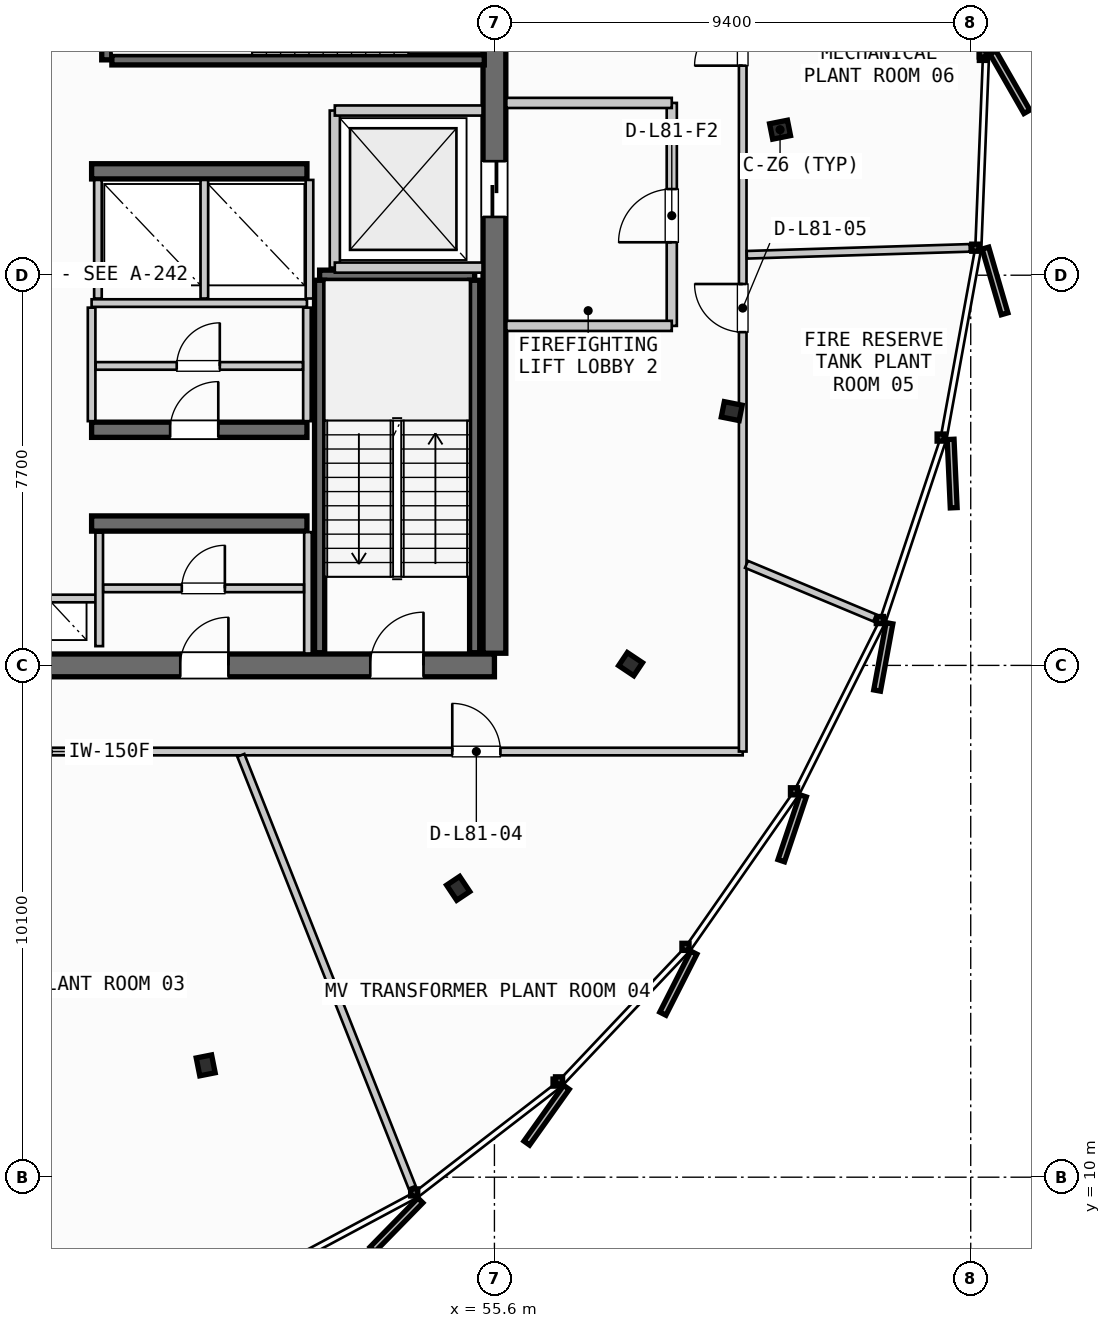
"""IFC4 building model, lengths in metres.
Left out: names, types, materials, properties, quantities, classifications, styles, units other than length and angle.
Written with IfcOpenShell. Run it as: python <this file> out.ifc"""

import sys

from ifc_helpers import new_model, si_unit, direction, frame, frame_2d, origin, origin_2d, place, context, subcontext, project, spatial, rectangle, i_section, extrude, source, transform, mapped, element, fill, save


model = new_model("IFC4")
c1 = context("Model", 3, precision=1e-05, world=origin(), true_north=direction((0.0, 1.0)))
c2 = subcontext(c1, "Body", "Model", "MODEL_VIEW")
j1 = project(units=[si_unit("LENGTHUNIT", "METRE"), si_unit("PLANEANGLEUNIT", "RADIAN")], contexts=[c1])
p1 = place(None, origin())
s1 = spatial("IfcSite", under=j1, at=p1, CompositionType="ELEMENT")
p2 = place(p1, origin())
s2 = spatial("IfcBuilding", under=s1, at=p2, CompositionType="ELEMENT")
p3 = place(p2, frame((0.0, 0.0, 304.3)))
s3 = spatial("IfcBuildingStorey", under=s2, at=p3, CompositionType="ELEMENT", Elevation=304.3)
p4 = place(p3, frame((38.0, 20.1, 0.0), z_axis=(0.0, 0.0, 1.0), x_axis=(1.0, 0.0, 0.0)))
e1 = element("IfcWall", 1, at=p4, inside=s3, PredefinedType="SHEAR", context=c2, shape_type="SweptSolid", body=[
    extrude(rectangle(XDim=17.6, YDim=0.45, at=frame_2d((8.8, 0.0))), origin(), (0.0, 0.0, 1.0), 3.735),
])
p5 = place(p4, frame((1.4, 0.0, 0.0)))
e2 = element("IfcOpeningElement", 2, at=p5, cuts=e1, PredefinedType="OPENING", context=c2, shape_type="SweptSolid", body=[
    extrude(rectangle(XDim=1.05, YDim=2.15, at=frame_2d((0.525, 1.075))), frame((0.0, 0.235, 0.0), z_axis=(0.0, -1.0, 0.0), x_axis=(1.0, 0.0, 0.0)), (0.0, 0.0, 1.0), 0.47),
])
p6 = place(p4, frame((15.15, 0.0, 0.0)))
e3 = element("IfcOpeningElement", 3, at=p6, cuts=e1, PredefinedType="OPENING", context=c2, shape_type="SweptSolid", body=[
    extrude(rectangle(XDim=1.05, YDim=2.15, at=frame_2d((0.525, 1.075))), frame((0.0, 0.235, 0.0), z_axis=(0.0, -1.0, 0.0), x_axis=(1.0, 0.0, 0.0)), (0.0, 0.0, 1.0), 0.47),
])
p7 = place(p4, frame((5.25, 0.0, 0.0)))
e4 = element("IfcOpeningElement", 4, at=p7, cuts=e1, PredefinedType="OPENING", context=c2, shape_type="SweptSolid", body=[
    extrude(rectangle(XDim=0.9, YDim=2.15, at=frame_2d((0.45, 1.075))), frame((0.0, 0.235, 0.0), z_axis=(0.0, -1.0, 0.0), x_axis=(1.0, 0.0, 0.0)), (0.0, 0.0, 1.0), 0.47),
])
p8 = place(p4, frame((11.4, 0.0, 0.0)))
e5 = element("IfcOpeningElement", 5, at=p8, cuts=e1, PredefinedType="OPENING", context=c2, shape_type="SweptSolid", body=[
    extrude(rectangle(XDim=0.95, YDim=2.15, at=frame_2d((0.475, 1.075))), frame((0.0, 0.235, 0.0), z_axis=(0.0, -1.0, 0.0), x_axis=(1.0, 0.0, 0.0)), (0.0, 0.0, 1.0), 0.47),
])
p9 = place(p3, frame((55.6, 20.34, 0.0), z_axis=(0.0, 0.0, 1.0), x_axis=(0.0, 1.0, 0.0)))
e6 = element("IfcWall", 6, at=p9, inside=s3, PredefinedType="SHEAR", context=c2, shape_type="SweptSolid", body=[
    extrude(rectangle(XDim=14.92, YDim=0.45, at=frame_2d((7.46, 0.0))), origin(), (0.0, 0.0, 1.0), 3.735),
])
p10 = place(p9, frame((12.71, 0.0, 0.0)))
e7 = element("IfcOpeningElement", 7, at=p10, cuts=e6, PredefinedType="OPENING", context=c2, shape_type="SweptSolid", body=[
    extrude(rectangle(XDim=1.05, YDim=2.15, at=frame_2d((0.525, 1.075))), frame((0.0, 0.235, 0.0), z_axis=(0.0, -1.0, 0.0), x_axis=(1.0, 0.0, 0.0)), (0.0, 0.0, 1.0), 0.47),
])
p11 = place(p9, frame((8.61, 0.0, 0.0)))
e8 = element("IfcOpeningElement", 8, at=p11, cuts=e6, PredefinedType="OPENING", context=c2, shape_type="SweptSolid", body=[
    extrude(rectangle(XDim=1.1, YDim=2.2, at=frame_2d((0.55, 1.1))), frame((0.0, 0.235, 0.0), z_axis=(0.0, -1.0, 0.0), x_axis=(1.0, 0.0, 0.0)), (0.0, 0.0, 1.0), 0.47),
])
p12 = place(p3, frame((47.65, 22.9, 0.0), z_axis=(0.0, 0.0, 1.0), x_axis=(1.0, 0.0, 0.0)))
e9 = element("IfcWall", 9, at=p12, inside=s3, PredefinedType="SHEAR", context=c2, shape_type="SweptSolid", body=[
    extrude(rectangle(XDim=4.25, YDim=0.3, at=frame_2d((2.125, 0.0))), origin(), (0.0, 0.0, 1.0), 3.735),
])
p13 = place(p3, frame((47.65, 24.75, 0.0), z_axis=(0.0, 0.0, 1.0), x_axis=(1.0, 0.0, 0.0)))
e10 = element("IfcWall", 10, at=p13, inside=s3, PredefinedType="SHEAR", context=c2, shape_type="SweptSolid", body=[
    extrude(rectangle(XDim=4.25, YDim=0.3, at=frame_2d((2.125, 0.0))), origin(), (0.0, 0.0, 1.0), 3.735),
])
p14 = place(p13, frame((1.55, 0.0, 0.0)))
e11 = element("IfcOpeningElement", 11, at=p14, cuts=e10, PredefinedType="OPENING", context=c2, shape_type="SweptSolid", body=[
    extrude(rectangle(XDim=0.95, YDim=2.15, at=frame_2d((0.475, 1.075))), frame((0.0, 0.16, 0.0), z_axis=(0.0, -1.0, 0.0), x_axis=(1.0, 0.0, 0.0)), (0.0, 0.0, 1.0), 0.32),
])
p15 = place(p3, frame((47.65, 29.85, 0.0), z_axis=(0.0, 0.0, 1.0), x_axis=(1.0, 0.0, 0.0)))
e12 = element("IfcWall", 12, at=p15, inside=s3, PredefinedType="SHEAR", context=c2, shape_type="SweptSolid", body=[
    extrude(rectangle(XDim=4.25, YDim=0.3, at=frame_2d((2.125, 0.0))), origin(), (0.0, 0.0, 1.0), 3.735),
])
m1 = source(origin(), c2, "Body", "SweptSolid", [
    extrude(i_section(OverallWidth=0.309, OverallDepth=0.359, WebThickness=0.016, FlangeThickness=0.026, FilletRadius=0.027, at=origin_2d()), origin(), (0.0, 0.0, 1.0), 3.735),
])
for number, where, z_axis, x_axis in (
    (13, (61.237, 30.672, 0.0), (0.0, 0.0, 1.0), (0.981, 0.195, 0.0)),
    (14, (49.902, 12.207, 0.0), (0.0, 0.0, 1.0), (0.195, -0.981, 0.0)),
    (15, (54.885, 15.7, 0.0), (0.0, 0.0, 1.0), (0.556, -0.831, 0.0)),
    (16, (58.287, 20.125, 0.0), (0.0, 0.0, 1.0), (0.831, -0.556, 0.0)),
    (17, (60.284, 25.118, 0.0), (0.0, 0.0, 1.0), (0.981, -0.195, 0.0)),
):
    element("IfcColumn", number, at=place(p3, frame(where, z_axis=z_axis, x_axis=x_axis)), inside=s3, PredefinedType="COLUMN", context=c2, shape_type="MappedRepresentation", body=[
        mapped(m1, transform((0.0, 0.0, 0.0), scale=1.0)),
    ])
p16 = place(p3, frame((52.15, 27.8, 0.0), z_axis=(0.0, 0.0, 1.0), x_axis=(1.0, 0.0, 0.0)))
e18 = element("IfcWall", 18, at=p16, inside=s3, PredefinedType="SHEAR", context=c2, shape_type="SweptSolid", body=[
    extrude(rectangle(XDim=3.06, YDim=0.2, at=frame_2d((1.53, 0.0))), origin(), (0.0, 0.0, 1.0), 3.735),
])
for number, where, z_axis, x_axis in (
    (19, (55.21, 27.7, 0.0), (0.0, 0.0, 1.0), (0.0, -1.0, 0.0)),
    (20, (52.15, 20.35, 0.0), (0.0, 0.0, 1.0), (0.0, 1.0, 0.0)),
):
    element("IfcWall", number, at=place(p3, frame(where, z_axis=z_axis, x_axis=x_axis)), inside=s3, PredefinedType="SHEAR", context=c2, shape_type="SweptSolid", body=[
        extrude(rectangle(XDim=7.35, YDim=0.2, at=frame_2d((3.675, 0.0))), origin(), (0.0, 0.0, 1.0), 3.735),
    ])
p17 = place(p3, frame((47.95, 32.05, 0.0), z_axis=(0.0, 0.0, 1.0), x_axis=(0.0, 1.0, 0.0)))
e21 = element("IfcWall", 21, at=p17, inside=s3, PredefinedType="SHEAR", context=c2, shape_type="SweptSolid", body=[
    extrude(rectangle(XDim=3.06, YDim=0.2, at=frame_2d((1.53, 0.0))), origin(), (0.0, 0.0, 1.0), 3.735),
])
p18 = place(p3, frame((55.4, 32.05, 0.0), z_axis=(0.0, 0.0, 1.0), x_axis=(-1.0, 0.0, 0.0)))
e22 = element("IfcWall", 22, at=p18, inside=s3, PredefinedType="SHEAR", context=c2, shape_type="SweptSolid", body=[
    extrude(rectangle(XDim=7.35, YDim=0.2, at=frame_2d((3.675, 0.0))), origin(), (0.0, 0.0, 1.0), 3.735),
])
p19 = place(p3, frame((45.8, 21.42, 0.0), z_axis=(0.0, 0.0, 1.0), x_axis=(1.0, 0.0, 0.0)))
e23 = element("IfcWall", 23, at=p19, inside=s3, PredefinedType="PARTITIONING", context=c2, shape_type="SweptSolid", body=[
    extrude(rectangle(XDim=2.0, YDim=0.15, at=frame_2d((1.0, 0.0))), origin(), (0.0, 0.0, 1.0), 3.26),
])
p20 = place(p3, frame((47.8, 20.48, 0.0), z_axis=(0.0, 0.0, 1.0), x_axis=(0.0, 1.0, 0.0)))
e24 = element("IfcWall", 24, at=p20, inside=s3, PredefinedType="PARTITIONING", context=c2, shape_type="SweptSolid", body=[
    extrude(rectangle(XDim=2.24, YDim=0.15, at=frame_2d((1.12, 0.0))), origin(), (0.0, 0.0, 1.0), 3.26),
])
p21 = place(p3, frame((52.45, 27.95, 0.0), z_axis=(0.0, 0.0, 1.0), x_axis=(0.0, 1.0, 0.0)))
e25 = element("IfcWall", 25, at=p21, inside=s3, PredefinedType="PARTITIONING", context=c2, shape_type="SweptSolid", body=[
    extrude(rectangle(XDim=3.1, YDim=0.2, at=frame_2d((1.55, 0.0))), origin(), (0.0, 0.0, 1.0), 3.26),
])
for number, where, z_axis, x_axis in (
    (26, (52.45, 27.95, 0.0), (0.0, 0.0, 1.0), (1.0, 0.0, 0.0)),
    (27, (52.45, 31.05, 0.0), (0.0, 0.0, 1.0), (1.0, 0.0, 0.0)),
):
    element("IfcWall", number, at=place(p3, frame(where, z_axis=z_axis, x_axis=x_axis)), inside=s3, PredefinedType="PARTITIONING", context=c2, shape_type="SweptSolid", body=[
        extrude(rectangle(XDim=2.915, YDim=0.2, at=frame_2d((1.458, 0.0))), origin(), (0.0, 0.0, 1.0), 3.26),
    ])
p22 = place(p3, frame((59.1, 26.8, 0.0), z_axis=(0.0, 0.0, 1.0), x_axis=(0.0, 1.0, 0.0)))
e28 = element("IfcWall", 28, at=p22, inside=s3, PredefinedType="PARTITIONING", context=c2, shape_type="SweptSolid", body=[
    extrude(rectangle(XDim=4.4, YDim=0.2, at=frame_2d((2.2, 0.0))), origin(), (0.0, 0.0, 1.0), 3.26),
])
p23 = place(p22, frame((1.65, 0.0, 0.0)))
e29 = element("IfcOpeningElement", 29, at=p23, cuts=e28, PredefinedType="OPENING", context=c2, shape_type="SweptSolid", body=[
    extrude(rectangle(XDim=1.05, YDim=2.15, at=frame_2d((0.525, 1.075))), frame((0.0, 0.11, 0.0), z_axis=(0.0, -1.0, 0.0), x_axis=(1.0, 0.0, 0.0)), (0.0, 0.0, 1.0), 0.22),
])
for number, where, z_axis, x_axis in (
    (30, (55.835, 26.8, 0.0), (0.0, 0.0, 1.0), (1.0, 0.0, 0.0)),
    (31, (55.835, 31.2, 0.0), (0.0, 0.0, 1.0), (1.0, 0.0, 0.0)),
):
    element("IfcWall", number, at=place(p3, frame(where, z_axis=z_axis, x_axis=x_axis)), inside=s3, PredefinedType="PARTITIONING", context=c2, shape_type="SweptSolid", body=[
        extrude(rectangle(XDim=3.265, YDim=0.2, at=frame_2d((1.633, 0.0))), origin(), (0.0, 0.0, 1.0), 3.26),
    ])
p24 = place(p3, frame((51.92, 20.335, 0.0), z_axis=(0.0, 0.0, 1.0), x_axis=(0.0, 1.0, 0.0)))
e32 = element("IfcWall", 32, at=p24, inside=s3, PredefinedType="PARTITIONING", context=c2, shape_type="SweptSolid", body=[
    extrude(rectangle(XDim=2.395, YDim=0.15, at=frame_2d((1.198, 0.0))), origin(), (0.0, 0.0, 1.0), 3.26),
])
p25 = place(p3, frame((47.88, 21.62, 0.0), z_axis=(0.0, 0.0, 1.0), x_axis=(1.0, 0.0, 0.0)))
e33 = element("IfcWall", 33, at=p25, inside=s3, PredefinedType="PARTITIONING", context=c2, shape_type="SweptSolid", body=[
    extrude(rectangle(XDim=3.96, YDim=0.15, at=frame_2d((1.98, 0.0))), origin(), (0.0, 0.0, 1.0), 3.26),
])
p26 = place(p25, frame((1.55, 0.0, 0.0)))
e34 = element("IfcOpeningElement", 34, at=p26, cuts=e33, PredefinedType="OPENING", context=c2, shape_type="SweptSolid", body=[
    extrude(rectangle(XDim=0.85, YDim=2.15, at=frame_2d((0.425, 1.075))), frame((0.0, 0.085, 0.0), z_axis=(0.0, -1.0, 0.0), x_axis=(1.0, 0.0, 0.0)), (0.0, 0.0, 1.0), 0.17),
])
p27 = place(p3, frame((47.65, 27.25, 0.0), z_axis=(0.0, 0.0, 1.0), x_axis=(1.0, 0.0, 0.0)))
e35 = element("IfcWall", 35, at=p27, inside=s3, PredefinedType="PARTITIONING", context=c2, shape_type="SweptSolid", body=[
    extrude(rectangle(XDim=4.25, YDim=0.15, at=frame_2d((2.125, 0.0))), origin(), (0.0, 0.0, 1.0), 3.26),
])
for number, where, z_axis, x_axis in (
    (36, (47.65, 24.92, 0.0), (0.0, 0.0, 1.0), (0.0, 1.0, 0.0)),
    (37, (51.9, 24.92, 0.0), (0.0, 0.0, 1.0), (0.0, 1.0, 0.0)),
):
    element("IfcWall", number, at=place(p3, frame(where, z_axis=z_axis, x_axis=x_axis)), inside=s3, PredefinedType="PARTITIONING", context=c2, shape_type="SweptSolid", body=[
        extrude(rectangle(XDim=2.24, YDim=0.15, at=frame_2d((1.12, 0.0))), origin(), (0.0, 0.0, 1.0), 3.26),
    ])
p28 = place(p3, frame((47.73, 26.01, 0.0), z_axis=(0.0, 0.0, 1.0), x_axis=(1.0, 0.0, 0.0)))
e38 = element("IfcWall", 38, at=p28, inside=s3, PredefinedType="PARTITIONING", context=c2, shape_type="SweptSolid", body=[
    extrude(rectangle(XDim=4.09, YDim=0.15, at=frame_2d((2.045, 0.0))), origin(), (0.0, 0.0, 1.0), 3.26),
])
p29 = place(p28, frame((1.6, 0.0, 0.0)))
e39 = element("IfcOpeningElement", 39, at=p29, cuts=e38, PredefinedType="OPENING", context=c2, shape_type="SweptSolid", body=[
    extrude(rectangle(XDim=0.85, YDim=2.15, at=frame_2d((0.425, 1.075))), frame((0.0, 0.085, 0.0), z_axis=(0.0, -1.0, 0.0), x_axis=(1.0, 0.0, 0.0)), (0.0, 0.0, 1.0), 0.17),
])
for number, where, z_axis, x_axis in (
    (40, (47.775, 27.34, 0.0), (0.0, 0.0, 1.0), (0.0, 1.0, 0.0)),
    (41, (49.875, 27.34, 0.0), (0.0, 0.0, 1.0), (0.0, 1.0, 0.0)),
    (42, (51.95, 27.34, 0.0), (0.0, 0.0, 1.0), (0.0, 1.0, 0.0)),
):
    element("IfcWall", number, at=place(p3, frame(where, z_axis=z_axis, x_axis=x_axis)), inside=s3, PredefinedType="PARTITIONING", context=c2, shape_type="SweptSolid", body=[
        extrude(rectangle(XDim=2.34, YDim=0.15, at=frame_2d((1.17, 0.0))), origin(), (0.0, 0.0, 1.0), 3.26),
    ])
p30 = place(p3, frame((33.1, 18.4, 0.0), z_axis=(0.0, 0.0, 1.0), x_axis=(1.0, 0.0, 0.0)))
e43 = element("IfcWall", 43, at=p30, inside=s3, PredefinedType="PARTITIONING", context=c2, shape_type="SweptSolid", body=[
    extrude(rectangle(XDim=27.4, YDim=0.15, at=frame_2d((13.7, 0.0))), origin(), (0.0, 0.0, 1.0), 3.26),
])
p31 = place(p30, frame((5.174, 0.0, 0.0)))
e44 = element("IfcOpeningElement", 44, at=p31, cuts=e43, PredefinedType="OPENING", context=c2, shape_type="SweptSolid", body=[
    extrude(rectangle(XDim=0.95, YDim=2.15, at=frame_2d((0.475, 1.075))), frame((0.0, 0.085, 0.0), z_axis=(0.0, -1.0, 0.0), x_axis=(1.0, 0.0, 0.0)), (0.0, 0.0, 1.0), 0.17),
])
p32 = place(p30, frame((12.302, 0.0, 0.0)))
e45 = element("IfcOpeningElement", 45, at=p32, cuts=e43, PredefinedType="OPENING", context=c2, shape_type="SweptSolid", body=[
    extrude(rectangle(XDim=0.95, YDim=2.15, at=frame_2d((0.475, 1.075))), frame((0.0, 0.085, 0.0), z_axis=(0.0, -1.0, 0.0), x_axis=(1.0, 0.0, 0.0)), (0.0, 0.0, 1.0), 0.17),
])
p33 = place(p30, frame((21.668, 0.0, 0.0)))
e46 = element("IfcOpeningElement", 46, at=p33, cuts=e43, PredefinedType="OPENING", context=c2, shape_type="SweptSolid", body=[
    extrude(rectangle(XDim=0.95, YDim=2.15, at=frame_2d((0.475, 1.075))), frame((0.0, 0.085, 0.0), z_axis=(0.0, -1.0, 0.0), x_axis=(1.0, 0.0, 0.0)), (0.0, 0.0, 1.0), 0.17),
])
p34 = place(p3, frame((60.5, 18.4, 0.0), z_axis=(0.0, 0.0, 1.0), x_axis=(0.0, 1.0, 0.0)))
e47 = element("IfcWall", 47, at=p34, inside=s3, PredefinedType="PARTITIONING", context=c2, shape_type="SweptSolid", body=[
    extrude(rectangle(XDim=18.8, YDim=0.15, at=frame_2d((9.4, 0.0))), origin(), (0.0, 0.0, 1.0), 3.26),
])
p35 = place(p34, frame((8.276, 0.0, 0.0)))
e48 = element("IfcOpeningElement", 48, at=p35, cuts=e47, PredefinedType="OPENING", context=c2, shape_type="SweptSolid", body=[
    extrude(rectangle(XDim=0.95, YDim=2.15, at=frame_2d((0.475, 1.075))), frame((0.0, 0.085, 0.0), z_axis=(0.0, -1.0, 0.0), x_axis=(1.0, 0.0, 0.0)), (0.0, 0.0, 1.0), 0.17),
])
p36 = place(p34, frame((13.535, 0.0, 0.0)))
e49 = element("IfcOpeningElement", 49, at=p36, cuts=e47, PredefinedType="OPENING", context=c2, shape_type="SweptSolid", body=[
    extrude(rectangle(XDim=0.95, YDim=2.15, at=frame_2d((0.475, 1.075))), frame((0.0, 0.085, 0.0), z_axis=(0.0, -1.0, 0.0), x_axis=(1.0, 0.0, 0.0)), (0.0, 0.0, 1.0), 0.17),
])
p37 = place(p3, frame((50.595, 18.326, 0.0), z_axis=(0.0, 0.0, 1.0), x_axis=(0.368634843387, -0.929574285488, 0.0)))
e50 = element("IfcWall", 50, at=p37, inside=s3, PredefinedType="PARTITIONING", context=c2, shape_type="SweptSolid", body=[
    extrude(rectangle(XDim=9.17, YDim=0.15, at=frame_2d((4.585, 0.0))), origin(), (0.0, 0.0, 1.0), 3.26),
])
p38 = place(p3, frame((60.574, 22.094, 0.0), z_axis=(0.0, 0.0, 1.0), x_axis=(0.92276063228, -0.385373605109, 0.0)))
e51 = element("IfcWall", 51, at=p38, inside=s3, PredefinedType="PARTITIONING", context=c2, shape_type="SweptSolid", body=[
    extrude(rectangle(XDim=2.743, YDim=0.15, at=frame_2d((1.372, 0.0))), origin(), (0.0, 0.0, 1.0), 3.26),
])
p39 = place(p3, frame((60.58, 28.203, 0.0), z_axis=(0.0, 0.0, 1.0), x_axis=(0.999517686505, 0.031054699536, 0.0)))
e52 = element("IfcWall", 52, at=p39, inside=s3, PredefinedType="PARTITIONING", context=c2, shape_type="SweptSolid", body=[
    extrude(rectangle(XDim=4.403, YDim=0.15, at=frame_2d((2.201, 0.0))), origin(), (0.0, 0.0, 1.0), 3.26),
])
m2 = source(origin(), c2, "Body", "SweptSolid", [
    extrude(rectangle(XDim=1.05, YDim=2.15, at=frame_2d((0.525, 1.075))), frame((0.0, 0.025, 0.0), z_axis=(0.0, -1.0, 0.0), x_axis=(1.0, 0.0, 0.0)), (0.0, 0.0, 1.0), 0.05),
])
p40 = place(p6, origin())
e53 = element("IfcDoor", 53, at=p40, inside=s3, OperationType="SINGLE_SWING_RIGHT", PredefinedType="DOOR", context=c2, shape_type="MappedRepresentation", body=[
    mapped(m2, transform((0.0, 0.0, 0.0), scale=1.0)),
])
fill(e3, e53)
m3 = source(origin(), c2, "Body", "SweptSolid", [
    extrude(rectangle(XDim=1.1, YDim=2.2, at=frame_2d((0.55, 1.1))), frame((0.0, 0.025, 0.0), z_axis=(0.0, -1.0, 0.0), x_axis=(1.0, 0.0, 0.0)), (0.0, 0.0, 1.0), 0.05),
])
p41 = place(p11, origin())
e54 = element("IfcDoor", 54, at=p41, inside=s3, OperationType="SLIDING_TO_RIGHT", PredefinedType="DOOR", context=c2, shape_type="MappedRepresentation", body=[
    mapped(m3, transform((0.0, 0.0, 0.0), scale=1.0)),
])
fill(e8, e54)
m4 = source(origin(), c2, "Body", "SweptSolid", [
    extrude(rectangle(XDim=0.95, YDim=2.15, at=frame_2d((0.475, 1.075))), frame((0.0, 0.025, 0.0), z_axis=(0.0, -1.0, 0.0), x_axis=(1.0, 0.0, 0.0)), (0.0, 0.0, 1.0), 0.05),
])
p42 = place(p8, origin())
e55 = element("IfcDoor", 55, at=p42, inside=s3, OperationType="SINGLE_SWING_RIGHT", PredefinedType="DOOR", context=c2, shape_type="MappedRepresentation", body=[
    mapped(m4, transform((0.0, 0.0, 0.0), scale=1.0)),
])
fill(e5, e55)
p43 = place(p14, origin())
e56 = element("IfcDoor", 56, at=p43, inside=s3, OperationType="SINGLE_SWING_RIGHT", PredefinedType="DOOR", context=c2, shape_type="MappedRepresentation", body=[
    mapped(m4, transform((0.0, 0.0, 0.0), scale=1.0)),
])
fill(e11, e56)
p44 = place(p23, origin())
e57 = element("IfcDoor", 57, at=p44, inside=s3, OperationType="SINGLE_SWING_LEFT", PredefinedType="DOOR", context=c2, shape_type="MappedRepresentation", body=[
    mapped(m2, transform((0.0, 0.0, 0.0), scale=1.0)),
])
fill(e29, e57)
m5 = source(origin(), c2, "Body", "SweptSolid", [
    extrude(rectangle(XDim=0.85, YDim=2.15, at=frame_2d((0.425, 1.075))), frame((0.0, 0.025, 0.0), z_axis=(0.0, -1.0, 0.0), x_axis=(1.0, 0.0, 0.0)), (0.0, 0.0, 1.0), 0.05),
])
p45 = place(p26, origin())
e58 = element("IfcDoor", 58, at=p45, inside=s3, OperationType="SINGLE_SWING_RIGHT", PredefinedType="DOOR", context=c2, shape_type="MappedRepresentation", body=[
    mapped(m5, transform((0.0, 0.0, 0.0), scale=1.0)),
])
fill(e34, e58)
p46 = place(p29, origin())
e59 = element("IfcDoor", 59, at=p46, inside=s3, OperationType="SINGLE_SWING_RIGHT", PredefinedType="DOOR", context=c2, shape_type="MappedRepresentation", body=[
    mapped(m5, transform((0.0, 0.0, 0.0), scale=1.0)),
])
fill(e39, e59)
p47 = place(p33, origin())
e60 = element("IfcDoor", 60, at=p47, inside=s3, OperationType="SINGLE_SWING_LEFT", PredefinedType="DOOR", context=c2, shape_type="MappedRepresentation", body=[
    mapped(m4, transform((0.0, 0.0, 0.0), scale=1.0)),
])
fill(e46, e60)
p48 = place(p35, origin())
e61 = element("IfcDoor", 61, at=p48, inside=s3, OperationType="SINGLE_SWING_RIGHT", PredefinedType="DOOR", context=c2, shape_type="MappedRepresentation", body=[
    mapped(m4, transform((0.0, 0.0, 0.0), scale=1.0)),
])
fill(e48, e61)
p49 = place(p36, origin())
e62 = element("IfcDoor", 62, at=p49, inside=s3, OperationType="SINGLE_SWING_LEFT", PredefinedType="DOOR", context=c2, shape_type="MappedRepresentation", body=[
    mapped(m4, transform((0.0, 0.0, 0.0), scale=1.0)),
])
fill(e49, e62)
save(model, sys.argv[1])
